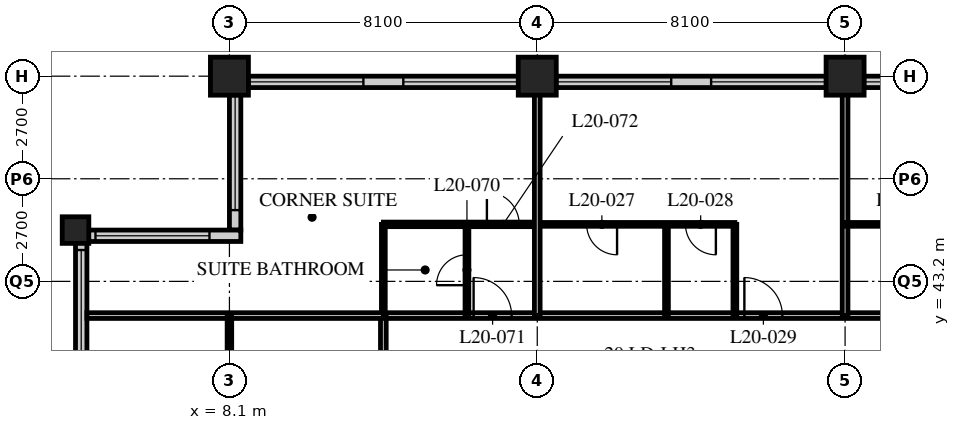
"""IFC4 building model, lengths in metres.
Left out: names, types, materials, properties, quantities, classifications, styles, units other than length and angle.
Written with IfcOpenShell. Run it as: python <this file> out.ifc"""

import sys

from ifc_helpers import new_model, si_unit, direction, frame, frame_2d, origin, origin_2d, place, context, subcontext, project, spatial, rectangle, hollow_rectangle, extrude, element, fill, save


model = new_model("IFC4")
c1 = context("Model", 3, precision=1e-05, world=origin(), true_north=direction((0.0, 1.0)))
c2 = subcontext(c1, "Body", "Model", "MODEL_VIEW")
j1 = project(units=[si_unit("LENGTHUNIT", "METRE"), si_unit("PLANEANGLEUNIT", "RADIAN")], contexts=[c1])
p1 = place(None, origin())
s1 = spatial("IfcSite", under=j1, at=p1, CompositionType="ELEMENT")
p2 = place(p1, origin())
s2 = spatial("IfcBuilding", under=s1, at=p2, CompositionType="ELEMENT")
p3 = place(p2, frame((0.0, 0.0, 80.6)))
s3 = spatial("IfcBuildingStorey", under=s2, at=p3, CompositionType="ELEMENT", Elevation=80.6)
p4 = place(p3, frame((4.05, 44.55, 0.0), z_axis=(0.0, 0.0, 1.0), x_axis=(1.0, 0.0, 0.0)))
e1 = element("IfcColumn", 1, at=p4, inside=s3, PredefinedType="COLUMN", context=c2, shape_type="SweptSolid", body=[
    extrude(hollow_rectangle(XDim=0.7, YDim=0.7, WallThickness=0.07, at=origin_2d()), origin(), (0.0, 0.0, 1.0), 3.4),
])
for number, where, z_axis, x_axis in (
    (2, (8.1, 48.6, 0.0), (0.0, 0.0, 1.0), (1.0, 0.0, 0.0)),
    (3, (16.2, 48.6, 0.0), (0.0, 0.0, 1.0), (1.0, 0.0, 0.0)),
    (4, (24.3, 48.6, 0.0), (0.0, 0.0, 1.0), (1.0, 0.0, 0.0)),
):
    element("IfcColumn", number, at=place(p3, frame(where, z_axis=z_axis, x_axis=x_axis)), inside=s3, PredefinedType="COLUMN", context=c2, shape_type="SweptSolid", body=[
        extrude(hollow_rectangle(XDim=1.0, YDim=1.0, WallThickness=0.1, at=origin_2d()), origin(), (0.0, 0.0, 1.0), 3.4),
    ])
p5 = place(p3, frame((48.3, 48.45, 0.0), z_axis=(0.0, 0.0, 1.0), x_axis=(-1.0, 0.0, 0.0)))
e5 = element("IfcWall", 5, at=p5, inside=s3, PredefinedType="SOLIDWALL", context=c2, shape_type="SweptSolid", body=[
    extrude(rectangle(XDim=40.2, YDim=0.3, at=frame_2d((20.1, 0.0))), origin(), (0.0, 0.0, 1.0), 3.19),
])
p6 = place(p5, frame((0.225, 0.0, 0.9)))
e6 = element("IfcOpeningElement", 6, at=p6, cuts=e5, PredefinedType="OPENING", context=c2, shape_type="SweptSolid", body=[
    extrude(rectangle(XDim=3.0, YDim=1.5, at=frame_2d((1.5, 0.75))), frame((0.0, 0.16, 0.0), z_axis=(0.0, -1.0, 0.0), x_axis=(1.0, 0.0, 0.0)), (0.0, 0.0, 1.0), 0.32),
])
p7 = place(p5, frame((4.275, 0.0, 0.9)))
e7 = element("IfcOpeningElement", 7, at=p7, cuts=e5, PredefinedType="OPENING", context=c2, shape_type="SweptSolid", body=[
    extrude(rectangle(XDim=3.0, YDim=1.5, at=frame_2d((1.5, 0.75))), frame((0.0, 0.16, 0.0), z_axis=(0.0, -1.0, 0.0), x_axis=(1.0, 0.0, 0.0)), (0.0, 0.0, 1.0), 0.32),
])
p8 = place(p5, frame((8.325, 0.0, 0.9)))
e8 = element("IfcOpeningElement", 8, at=p8, cuts=e5, PredefinedType="OPENING", context=c2, shape_type="SweptSolid", body=[
    extrude(rectangle(XDim=3.0, YDim=1.5, at=frame_2d((1.5, 0.75))), frame((0.0, 0.16, 0.0), z_axis=(0.0, -1.0, 0.0), x_axis=(1.0, 0.0, 0.0)), (0.0, 0.0, 1.0), 0.32),
])
p9 = place(p5, frame((12.375, 0.0, 0.9)))
e9 = element("IfcOpeningElement", 9, at=p9, cuts=e5, PredefinedType="OPENING", context=c2, shape_type="SweptSolid", body=[
    extrude(rectangle(XDim=3.0, YDim=1.5, at=frame_2d((1.5, 0.75))), frame((0.0, 0.16, 0.0), z_axis=(0.0, -1.0, 0.0), x_axis=(1.0, 0.0, 0.0)), (0.0, 0.0, 1.0), 0.32),
])
p10 = place(p5, frame((16.425, 0.0, 0.9)))
e10 = element("IfcOpeningElement", 10, at=p10, cuts=e5, PredefinedType="OPENING", context=c2, shape_type="SweptSolid", body=[
    extrude(rectangle(XDim=3.0, YDim=1.5, at=frame_2d((1.5, 0.75))), frame((0.0, 0.16, 0.0), z_axis=(0.0, -1.0, 0.0), x_axis=(1.0, 0.0, 0.0)), (0.0, 0.0, 1.0), 0.32),
])
p11 = place(p5, frame((20.475, 0.0, 0.9)))
e11 = element("IfcOpeningElement", 11, at=p11, cuts=e5, PredefinedType="OPENING", context=c2, shape_type="SweptSolid", body=[
    extrude(rectangle(XDim=3.0, YDim=1.5, at=frame_2d((1.5, 0.75))), frame((0.0, 0.16, 0.0), z_axis=(0.0, -1.0, 0.0), x_axis=(1.0, 0.0, 0.0)), (0.0, 0.0, 1.0), 0.32),
])
p12 = place(p5, frame((24.525, 0.0, 0.9)))
e12 = element("IfcOpeningElement", 12, at=p12, cuts=e5, PredefinedType="OPENING", context=c2, shape_type="SweptSolid", body=[
    extrude(rectangle(XDim=3.0, YDim=1.5, at=frame_2d((1.5, 0.75))), frame((0.0, 0.16, 0.0), z_axis=(0.0, -1.0, 0.0), x_axis=(1.0, 0.0, 0.0)), (0.0, 0.0, 1.0), 0.32),
])
p13 = place(p5, frame((28.575, 0.0, 0.9)))
e13 = element("IfcOpeningElement", 13, at=p13, cuts=e5, PredefinedType="OPENING", context=c2, shape_type="SweptSolid", body=[
    extrude(rectangle(XDim=3.0, YDim=1.5, at=frame_2d((1.5, 0.75))), frame((0.0, 0.16, 0.0), z_axis=(0.0, -1.0, 0.0), x_axis=(1.0, 0.0, 0.0)), (0.0, 0.0, 1.0), 0.32),
])
p14 = place(p5, frame((32.625, 0.0, 0.9)))
e14 = element("IfcOpeningElement", 14, at=p14, cuts=e5, PredefinedType="OPENING", context=c2, shape_type="SweptSolid", body=[
    extrude(rectangle(XDim=3.0, YDim=1.5, at=frame_2d((1.5, 0.75))), frame((0.0, 0.16, 0.0), z_axis=(0.0, -1.0, 0.0), x_axis=(1.0, 0.0, 0.0)), (0.0, 0.0, 1.0), 0.32),
])
p15 = place(p5, frame((36.675, 0.0, 0.9)))
e15 = element("IfcOpeningElement", 15, at=p15, cuts=e5, PredefinedType="OPENING", context=c2, shape_type="SweptSolid", body=[
    extrude(rectangle(XDim=3.0, YDim=1.5, at=frame_2d((1.5, 0.75))), frame((0.0, 0.16, 0.0), z_axis=(0.0, -1.0, 0.0), x_axis=(1.0, 0.0, 0.0)), (0.0, 0.0, 1.0), 0.32),
])
p16 = place(p3, frame((8.25, 48.3, 0.0), z_axis=(0.0, 0.0, 1.0), x_axis=(0.0, -1.0, 0.0)))
e16 = element("IfcWall", 16, at=p16, inside=s3, PredefinedType="SOLIDWALL", context=c2, shape_type="SweptSolid", body=[
    extrude(rectangle(XDim=3.75, YDim=0.3, at=frame_2d((1.875, 0.0))), origin(), (0.0, 0.0, 1.0), 3.19),
])
p17 = place(p16, frame((0.225, 0.0, 0.9)))
e17 = element("IfcOpeningElement", 17, at=p17, cuts=e16, PredefinedType="OPENING", context=c2, shape_type="SweptSolid", body=[
    extrude(rectangle(XDim=3.0, YDim=1.5, at=frame_2d((1.5, 0.75))), frame((0.0, 0.16, 0.0), z_axis=(0.0, -1.0, 0.0), x_axis=(1.0, 0.0, 0.0)), (0.0, 0.0, 1.0), 0.32),
])
p18 = place(p3, frame((8.4, 44.4, 0.0), z_axis=(0.0, 0.0, 1.0), x_axis=(-1.0, 0.0, 0.0)))
e18 = element("IfcWall", 18, at=p18, inside=s3, PredefinedType="SOLIDWALL", context=c2, shape_type="SweptSolid", body=[
    extrude(rectangle(XDim=4.35, YDim=0.3, at=frame_2d((2.175, 0.0))), origin(), (0.0, 0.0, 1.0), 3.19),
])
p19 = place(p18, frame((0.825, 0.0, 0.9)))
e19 = element("IfcOpeningElement", 19, at=p19, cuts=e18, PredefinedType="OPENING", context=c2, shape_type="SweptSolid", body=[
    extrude(rectangle(XDim=3.0, YDim=1.5, at=frame_2d((1.5, 0.75))), frame((0.0, 0.16, 0.0), z_axis=(0.0, -1.0, 0.0), x_axis=(1.0, 0.0, 0.0)), (0.0, 0.0, 1.0), 0.32),
])
p20 = place(p3, frame((4.2, 44.25, 0.0), z_axis=(0.0, 0.0, 1.0), x_axis=(0.0, -1.0, 0.0)))
e20 = element("IfcWall", 20, at=p20, inside=s3, PredefinedType="SOLIDWALL", context=c2, shape_type="SweptSolid", body=[
    extrude(rectangle(XDim=3.75, YDim=0.3, at=frame_2d((1.875, 0.0))), origin(), (0.0, 0.0, 1.0), 3.19),
])
p21 = place(p20, frame((0.225, 0.0, 0.9)))
e21 = element("IfcOpeningElement", 21, at=p21, cuts=e20, PredefinedType="OPENING", context=c2, shape_type="SweptSolid", body=[
    extrude(rectangle(XDim=3.0, YDim=1.5, at=frame_2d((1.5, 0.75))), frame((0.0, 0.16, 0.0), z_axis=(0.0, -1.0, 0.0), x_axis=(1.0, 0.0, 0.0)), (0.0, 0.0, 1.0), 0.32),
])
p22 = place(p3, frame((12.15, 42.3, 0.0), z_axis=(0.0, 0.0, 1.0), x_axis=(1.0, 0.0, 0.0)))
e22 = element("IfcWall", 22, at=p22, inside=s3, PredefinedType="PARTITIONING", context=c2, shape_type="SweptSolid", body=[
    extrude(rectangle(XDim=36.45, YDim=0.15, at=frame_2d((18.225, 0.0))), origin(), (0.0, 0.0, 1.0), 3.19),
])
p23 = place(p22, frame((9.5, 0.0, 0.0)))
e23 = element("IfcOpeningElement", 23, at=p23, cuts=e22, PredefinedType="OPENING", context=c2, shape_type="SweptSolid", body=[
    extrude(rectangle(XDim=1.0, YDim=2.1, at=frame_2d((0.5, 1.05))), frame((0.0, 0.085, 0.0), z_axis=(0.0, -1.0, 0.0), x_axis=(1.0, 0.0, 0.0)), (0.0, 0.0, 1.0), 0.17),
])
p24 = place(p22, frame((17.6, 0.0, 0.0)))
e24 = element("IfcOpeningElement", 24, at=p24, cuts=e22, PredefinedType="OPENING", context=c2, shape_type="SweptSolid", body=[
    extrude(rectangle(XDim=1.0, YDim=2.1, at=frame_2d((0.5, 1.05))), frame((0.0, 0.085, 0.0), z_axis=(0.0, -1.0, 0.0), x_axis=(1.0, 0.0, 0.0)), (0.0, 0.0, 1.0), 0.17),
])
p25 = place(p22, frame((22.7, 0.0, 0.0)))
e25 = element("IfcOpeningElement", 25, at=p25, cuts=e22, PredefinedType="OPENING", context=c2, shape_type="SweptSolid", body=[
    extrude(rectangle(XDim=1.0, YDim=2.1, at=frame_2d((0.5, 1.05))), frame((0.0, 0.085, 0.0), z_axis=(0.0, -1.0, 0.0), x_axis=(1.0, 0.0, 0.0)), (0.0, 0.0, 1.0), 0.17),
])
p26 = place(p22, frame((26.75, 0.0, 0.0)))
e26 = element("IfcOpeningElement", 26, at=p26, cuts=e22, PredefinedType="OPENING", context=c2, shape_type="SweptSolid", body=[
    extrude(rectangle(XDim=1.0, YDim=2.1, at=frame_2d((0.5, 1.05))), frame((0.0, 0.085, 0.0), z_axis=(0.0, -1.0, 0.0), x_axis=(1.0, 0.0, 0.0)), (0.0, 0.0, 1.0), 0.17),
])
p27 = place(p22, frame((30.8, 0.0, 0.0)))
e27 = element("IfcOpeningElement", 27, at=p27, cuts=e22, PredefinedType="OPENING", context=c2, shape_type="SweptSolid", body=[
    extrude(rectangle(XDim=1.0, YDim=2.1, at=frame_2d((0.5, 1.05))), frame((0.0, 0.085, 0.0), z_axis=(0.0, -1.0, 0.0), x_axis=(1.0, 0.0, 0.0)), (0.0, 0.0, 1.0), 0.17),
])
p28 = place(p22, frame((32.825, 0.0, 0.0)))
e28 = element("IfcOpeningElement", 28, at=p28, cuts=e22, PredefinedType="OPENING", context=c2, shape_type="SweptSolid", body=[
    extrude(rectangle(XDim=1.0, YDim=2.1, at=frame_2d((0.5, 1.05))), frame((0.0, 0.085, 0.0), z_axis=(0.0, -1.0, 0.0), x_axis=(1.0, 0.0, 0.0)), (0.0, 0.0, 1.0), 0.17),
])
p29 = place(p22, frame((2.375, 0.0, 0.0)))
e29 = element("IfcOpeningElement", 29, at=p29, cuts=e22, PredefinedType="OPENING", context=c2, shape_type="SweptSolid", body=[
    extrude(rectangle(XDim=1.0, YDim=2.1, at=frame_2d((0.5, 1.05))), frame((0.0, 0.085, 0.0), z_axis=(0.0, -1.0, 0.0), x_axis=(1.0, 0.0, 0.0)), (0.0, 0.0, 1.0), 0.17),
])
p30 = place(p3, frame((12.15, 16.2, 0.0), z_axis=(0.0, 0.0, 1.0), x_axis=(0.0, 1.0, 0.0)))
e30 = element("IfcWall", 30, at=p30, inside=s3, PredefinedType="PARTITIONING", context=c2, shape_type="SweptSolid", body=[
    extrude(rectangle(XDim=26.1, YDim=0.15, at=frame_2d((13.05, 0.0))), origin(), (0.0, 0.0, 1.0), 3.19),
])
p31 = place(p30, frame((0.3, 0.0, 0.0)))
e31 = element("IfcOpeningElement", 31, at=p31, cuts=e30, PredefinedType="OPENING", context=c2, shape_type="SweptSolid", body=[
    extrude(rectangle(XDim=1.0, YDim=2.1, at=frame_2d((0.5, 1.05))), frame((0.0, 0.085, 0.0), z_axis=(0.0, -1.0, 0.0), x_axis=(1.0, 0.0, 0.0)), (0.0, 0.0, 1.0), 0.17),
])
p32 = place(p30, frame((6.5, 0.0, 0.0)))
e32 = element("IfcOpeningElement", 32, at=p32, cuts=e30, PredefinedType="OPENING", context=c2, shape_type="SweptSolid", body=[
    extrude(rectangle(XDim=1.0, YDim=2.1, at=frame_2d((0.5, 1.05))), frame((0.0, 0.085, 0.0), z_axis=(0.0, -1.0, 0.0), x_axis=(1.0, 0.0, 0.0)), (0.0, 0.0, 1.0), 0.17),
])
p33 = place(p30, frame((13.55, 0.0, 0.0)))
e33 = element("IfcOpeningElement", 33, at=p33, cuts=e30, PredefinedType="OPENING", context=c2, shape_type="SweptSolid", body=[
    extrude(rectangle(XDim=1.0, YDim=2.1, at=frame_2d((0.5, 1.05))), frame((0.0, 0.085, 0.0), z_axis=(0.0, -1.0, 0.0), x_axis=(1.0, 0.0, 0.0)), (0.0, 0.0, 1.0), 0.17),
])
p34 = place(p30, frame((21.65, 0.0, 0.0)))
e34 = element("IfcOpeningElement", 34, at=p34, cuts=e30, PredefinedType="OPENING", context=c2, shape_type="SweptSolid", body=[
    extrude(rectangle(XDim=1.0, YDim=2.1, at=frame_2d((0.5, 1.05))), frame((0.0, 0.085, 0.0), z_axis=(0.0, -1.0, 0.0), x_axis=(1.0, 0.0, 0.0)), (0.0, 0.0, 1.0), 0.17),
])
p35 = place(p3, frame((16.2, 44.7, 0.0), z_axis=(0.0, 0.0, 1.0), x_axis=(1.0, 0.0, 0.0)))
e35 = element("IfcWall", 35, at=p35, inside=s3, PredefinedType="PARTITIONING", context=c2, shape_type="SweptSolid", body=[
    extrude(rectangle(XDim=5.2, YDim=0.1, at=frame_2d((2.6, 0.0))), origin(), (0.0, 0.0, 1.0), 3.19),
])
p36 = place(p35, frame((1.3, 0.0, 0.0)))
e36 = element("IfcOpeningElement", 36, at=p36, cuts=e35, PredefinedType="OPENING", context=c2, shape_type="SweptSolid", body=[
    extrude(rectangle(XDim=0.8, YDim=2.1, at=frame_2d((0.4, 1.05))), frame((0.0, 0.06, 0.0), z_axis=(0.0, -1.0, 0.0), x_axis=(1.0, 0.0, 0.0)), (0.0, 0.0, 1.0), 0.12),
])
p37 = place(p35, frame((3.9, 0.0, 0.0)))
e37 = element("IfcOpeningElement", 37, at=p37, cuts=e35, PredefinedType="OPENING", context=c2, shape_type="SweptSolid", body=[
    extrude(rectangle(XDim=0.8, YDim=2.1, at=frame_2d((0.4, 1.05))), frame((0.0, 0.06, 0.0), z_axis=(0.0, -1.0, 0.0), x_axis=(1.0, 0.0, 0.0)), (0.0, 0.0, 1.0), 0.12),
])
for number, where, z_axis, x_axis in (
    (38, (19.6, 42.3, 0.0), (0.0, 0.0, 1.0), (0.0, 1.0, 0.0)),
    (39, (21.4, 42.3, 0.0), (0.0, 0.0, 1.0), (0.0, 1.0, 0.0)),
):
    element("IfcWall", number, at=place(p3, frame(where, z_axis=z_axis, x_axis=x_axis)), inside=s3, PredefinedType="PARTITIONING", context=c2, shape_type="SweptSolid", body=[
        extrude(rectangle(XDim=2.4, YDim=0.1, at=frame_2d((1.2, 0.0))), origin(), (0.0, 0.0, 1.0), 3.19),
    ])
p38 = place(p3, frame((24.3, 42.3, 0.0), z_axis=(0.0, 0.0, 1.0), x_axis=(0.0, 1.0, 0.0)))
e40 = element("IfcWall", 40, at=p38, inside=s3, PredefinedType="PARTITIONING", context=c2, shape_type="SweptSolid", body=[
    extrude(rectangle(XDim=6.0, YDim=0.15, at=frame_2d((3.0, 0.0))), origin(), (0.0, 0.0, 1.0), 2.428),
])
p39 = place(p3, frame((24.3, 44.7, 0.0), z_axis=(0.0, 0.0, 1.0), x_axis=(1.0, 0.0, 0.0)))
e41 = element("IfcWall", 41, at=p39, inside=s3, PredefinedType="PARTITIONING", context=c2, shape_type="SweptSolid", body=[
    extrude(rectangle(XDim=5.2, YDim=0.1, at=frame_2d((2.6, 0.0))), origin(), (0.0, 0.0, 1.0), 3.19),
])
p40 = place(p39, frame((1.3, 0.0, 0.0)))
e42 = element("IfcOpeningElement", 42, at=p40, cuts=e41, PredefinedType="OPENING", context=c2, shape_type="SweptSolid", body=[
    extrude(rectangle(XDim=0.8, YDim=2.1, at=frame_2d((0.4, 1.05))), frame((0.0, 0.06, 0.0), z_axis=(0.0, -1.0, 0.0), x_axis=(1.0, 0.0, 0.0)), (0.0, 0.0, 1.0), 0.12),
])
p41 = place(p39, frame((3.9, 0.0, 0.0)))
e43 = element("IfcOpeningElement", 43, at=p41, cuts=e41, PredefinedType="OPENING", context=c2, shape_type="SweptSolid", body=[
    extrude(rectangle(XDim=0.8, YDim=2.1, at=frame_2d((0.4, 1.05))), frame((0.0, 0.06, 0.0), z_axis=(0.0, -1.0, 0.0), x_axis=(1.0, 0.0, 0.0)), (0.0, 0.0, 1.0), 0.12),
])
p42 = place(p3, frame((12.15, 44.7, 0.0), z_axis=(0.0, 0.0, 1.0), x_axis=(1.0, 0.0, 0.0)))
e44 = element("IfcWall", 44, at=p42, inside=s3, PredefinedType="PARTITIONING", context=c2, shape_type="SweptSolid", body=[
    extrude(rectangle(XDim=4.05, YDim=0.12, at=frame_2d((2.025, 0.0))), origin(), (0.0, 0.0, 1.0), 3.19),
])
p43 = place(p42, frame((2.725, 0.0, 0.0)))
e45 = element("IfcOpeningElement", 45, at=p43, cuts=e44, PredefinedType="OPENING", context=c2, shape_type="SweptSolid", body=[
    extrude(rectangle(XDim=0.85, YDim=2.1, at=frame_2d((0.425, 1.05))), frame((0.0, 0.07, 0.0), z_axis=(0.0, -1.0, 0.0), x_axis=(1.0, 0.0, 0.0)), (0.0, 0.0, 1.0), 0.14),
])
p44 = place(p3, frame((14.35, 42.3, 0.0), z_axis=(0.0, 0.0, 1.0), x_axis=(0.0, 1.0, 0.0)))
e46 = element("IfcWall", 46, at=p44, inside=s3, PredefinedType="PARTITIONING", context=c2, shape_type="SweptSolid", body=[
    extrude(rectangle(XDim=2.4, YDim=0.1, at=frame_2d((1.2, 0.0))), origin(), (0.0, 0.0, 1.0), 3.19),
])
p45 = place(p44, frame((0.8, 0.0, 0.0)))
e47 = element("IfcOpeningElement", 47, at=p45, cuts=e46, PredefinedType="OPENING", context=c2, shape_type="SweptSolid", body=[
    extrude(rectangle(XDim=0.8, YDim=2.1, at=frame_2d((0.4, 1.05))), frame((0.0, 0.06, 0.0), z_axis=(0.0, -1.0, 0.0), x_axis=(1.0, 0.0, 0.0)), (0.0, 0.0, 1.0), 0.12),
])
p46 = place(p3, frame((12.15, 42.3, 0.0), z_axis=(0.0, 0.0, 1.0), x_axis=(0.0, 1.0, 0.0)))
e48 = element("IfcWall", 48, at=p46, inside=s3, PredefinedType="PARTITIONING", context=c2, shape_type="SweptSolid", body=[
    extrude(rectangle(XDim=2.4, YDim=0.1, at=frame_2d((1.2, 0.0))), origin(), (0.0, 0.0, 1.0), 3.19),
])
p47 = place(p3, frame((4.35, 42.3, 0.0), z_axis=(0.0, 0.0, 1.0), x_axis=(1.0, 0.0, 0.0)))
e49 = element("IfcWall", 49, at=p47, inside=s3, PredefinedType="PARTITIONING", context=c2, shape_type="SweptSolid", body=[
    extrude(rectangle(XDim=7.8, YDim=0.15, at=frame_2d((3.9, 0.0))), origin(), (0.0, 0.0, 1.0), 3.19),
])
p48 = place(p3, frame((16.2, 42.3, 0.0), z_axis=(0.0, 0.0, 1.0), x_axis=(0.0, 1.0, 0.0)))
e50 = element("IfcWall", 50, at=p48, inside=s3, PredefinedType="PARTITIONING", context=c2, shape_type="SweptSolid", body=[
    extrude(rectangle(XDim=6.0, YDim=0.15, at=frame_2d((3.0, 0.0))), origin(), (0.0, 0.0, 1.0), 2.428),
])
p49 = place(p3, frame((8.1, 42.3, 0.0), z_axis=(0.0, 0.0, 1.0), x_axis=(0.0, -1.0, 0.0)))
e51 = element("IfcWall", 51, at=p49, inside=s3, PredefinedType="PARTITIONING", context=c2, shape_type="SweptSolid", body=[
    extrude(rectangle(XDim=1.325, YDim=0.12, at=frame_2d((0.663, 0.0))), origin(), (0.0, 0.0, 1.0), 2.428),
])
p50 = place(p11, origin())
e52 = element("IfcWindow", 52, at=p50, inside=s3, PartitioningType="SINGLE_PANEL", PredefinedType="WINDOW", context=c2, shape_type="SweptSolid", body=[
    extrude(rectangle(XDim=3.0, YDim=1.5, at=frame_2d((1.5, 0.75))), frame((0.0, 0.03, 0.0), z_axis=(0.0, -1.0, 0.0), x_axis=(1.0, 0.0, 0.0)), (0.0, 0.0, 1.0), 0.06),
])
fill(e11, e52)
p51 = place(p12, origin())
e53 = element("IfcWindow", 53, at=p51, inside=s3, PartitioningType="SINGLE_PANEL", PredefinedType="WINDOW", context=c2, shape_type="SweptSolid", body=[
    extrude(rectangle(XDim=3.0, YDim=1.5, at=frame_2d((1.5, 0.75))), frame((0.0, 0.03, 0.0), z_axis=(0.0, -1.0, 0.0), x_axis=(1.0, 0.0, 0.0)), (0.0, 0.0, 1.0), 0.06),
])
fill(e12, e53)
p52 = place(p13, origin())
e54 = element("IfcWindow", 54, at=p52, inside=s3, PartitioningType="SINGLE_PANEL", PredefinedType="WINDOW", context=c2, shape_type="SweptSolid", body=[
    extrude(rectangle(XDim=3.0, YDim=1.5, at=frame_2d((1.5, 0.75))), frame((0.0, 0.03, 0.0), z_axis=(0.0, -1.0, 0.0), x_axis=(1.0, 0.0, 0.0)), (0.0, 0.0, 1.0), 0.06),
])
fill(e13, e54)
p53 = place(p14, origin())
e55 = element("IfcWindow", 55, at=p53, inside=s3, PartitioningType="SINGLE_PANEL", PredefinedType="WINDOW", context=c2, shape_type="SweptSolid", body=[
    extrude(rectangle(XDim=3.0, YDim=1.5, at=frame_2d((1.5, 0.75))), frame((0.0, 0.03, 0.0), z_axis=(0.0, -1.0, 0.0), x_axis=(1.0, 0.0, 0.0)), (0.0, 0.0, 1.0), 0.06),
])
fill(e14, e55)
p54 = place(p15, origin())
e56 = element("IfcWindow", 56, at=p54, inside=s3, PartitioningType="SINGLE_PANEL", PredefinedType="WINDOW", context=c2, shape_type="SweptSolid", body=[
    extrude(rectangle(XDim=3.0, YDim=1.5, at=frame_2d((1.5, 0.75))), frame((0.0, 0.03, 0.0), z_axis=(0.0, -1.0, 0.0), x_axis=(1.0, 0.0, 0.0)), (0.0, 0.0, 1.0), 0.06),
])
fill(e15, e56)
p55 = place(p17, origin())
e57 = element("IfcWindow", 57, at=p55, inside=s3, PartitioningType="SINGLE_PANEL", PredefinedType="WINDOW", context=c2, shape_type="SweptSolid", body=[
    extrude(rectangle(XDim=3.0, YDim=1.5, at=frame_2d((1.5, 0.75))), frame((0.0, 0.03, 0.0), z_axis=(0.0, -1.0, 0.0), x_axis=(1.0, 0.0, 0.0)), (0.0, 0.0, 1.0), 0.06),
])
fill(e17, e57)
p56 = place(p19, origin())
e58 = element("IfcWindow", 58, at=p56, inside=s3, PartitioningType="SINGLE_PANEL", PredefinedType="WINDOW", context=c2, shape_type="SweptSolid", body=[
    extrude(rectangle(XDim=3.0, YDim=1.5, at=frame_2d((1.5, 0.75))), frame((0.0, 0.03, 0.0), z_axis=(0.0, -1.0, 0.0), x_axis=(1.0, 0.0, 0.0)), (0.0, 0.0, 1.0), 0.06),
])
fill(e19, e58)
p57 = place(p21, origin())
e59 = element("IfcWindow", 59, at=p57, inside=s3, PartitioningType="SINGLE_PANEL", PredefinedType="WINDOW", context=c2, shape_type="SweptSolid", body=[
    extrude(rectangle(XDim=3.0, YDim=1.5, at=frame_2d((1.5, 0.75))), frame((0.0, 0.03, 0.0), z_axis=(0.0, -1.0, 0.0), x_axis=(1.0, 0.0, 0.0)), (0.0, 0.0, 1.0), 0.06),
])
fill(e21, e59)
p58 = place(p36, origin())
e60 = element("IfcDoor", 60, at=p58, inside=s3, OperationType="SINGLE_SWING_LEFT", PredefinedType="DOOR", context=c2, shape_type="SweptSolid", body=[
    extrude(rectangle(XDim=0.8, YDim=2.1, at=frame_2d((0.4, 1.05))), frame((0.0, 0.025, 0.0), z_axis=(0.0, -1.0, 0.0), x_axis=(1.0, 0.0, 0.0)), (0.0, 0.0, 1.0), 0.05),
])
fill(e36, e60)
p59 = place(p37, origin())
e61 = element("IfcDoor", 61, at=p59, inside=s3, OperationType="SINGLE_SWING_LEFT", PredefinedType="DOOR", context=c2, shape_type="SweptSolid", body=[
    extrude(rectangle(XDim=0.8, YDim=2.1, at=frame_2d((0.4, 1.05))), frame((0.0, 0.025, 0.0), z_axis=(0.0, -1.0, 0.0), x_axis=(1.0, 0.0, 0.0)), (0.0, 0.0, 1.0), 0.05),
])
fill(e37, e61)
p60 = place(p23, origin())
e62 = element("IfcDoor", 62, at=p60, inside=s3, OperationType="SINGLE_SWING_LEFT", PredefinedType="DOOR", context=c2, shape_type="SweptSolid", body=[
    extrude(rectangle(XDim=1.0, YDim=2.1, at=frame_2d((0.5, 1.05))), frame((0.0, 0.025, 0.0), z_axis=(0.0, -1.0, 0.0), x_axis=(1.0, 0.0, 0.0)), (0.0, 0.0, 1.0), 0.05),
])
fill(e23, e62)
p61 = place(p45, origin())
e63 = element("IfcDoor", 63, at=p61, inside=s3, OperationType="SINGLE_SWING_LEFT", PredefinedType="DOOR", context=c2, shape_type="SweptSolid", body=[
    extrude(rectangle(XDim=0.8, YDim=2.1, at=frame_2d((0.4, 1.05))), frame((0.0, 0.025, 0.0), z_axis=(0.0, -1.0, 0.0), x_axis=(1.0, 0.0, 0.0)), (0.0, 0.0, 1.0), 0.05),
])
fill(e47, e63)
p62 = place(p29, origin())
e64 = element("IfcDoor", 64, at=p62, inside=s3, OperationType="SINGLE_SWING_LEFT", PredefinedType="DOOR", context=c2, shape_type="SweptSolid", body=[
    extrude(rectangle(XDim=1.0, YDim=2.1, at=frame_2d((0.5, 1.05))), frame((0.0, 0.025, 0.0), z_axis=(0.0, -1.0, 0.0), x_axis=(1.0, 0.0, 0.0)), (0.0, 0.0, 1.0), 0.05),
])
fill(e29, e64)
p63 = place(p43, origin())
e65 = element("IfcDoor", 65, at=p63, inside=s3, OperationType="SINGLE_SWING_LEFT", PredefinedType="DOOR", context=c2, shape_type="SweptSolid", body=[
    extrude(rectangle(XDim=0.85, YDim=2.1, at=frame_2d((0.425, 1.05))), frame((0.0, 0.025, 0.0), z_axis=(0.0, -1.0, 0.0), x_axis=(1.0, 0.0, 0.0)), (0.0, 0.0, 1.0), 0.05),
])
fill(e45, e65)
save(model, sys.argv[1])
